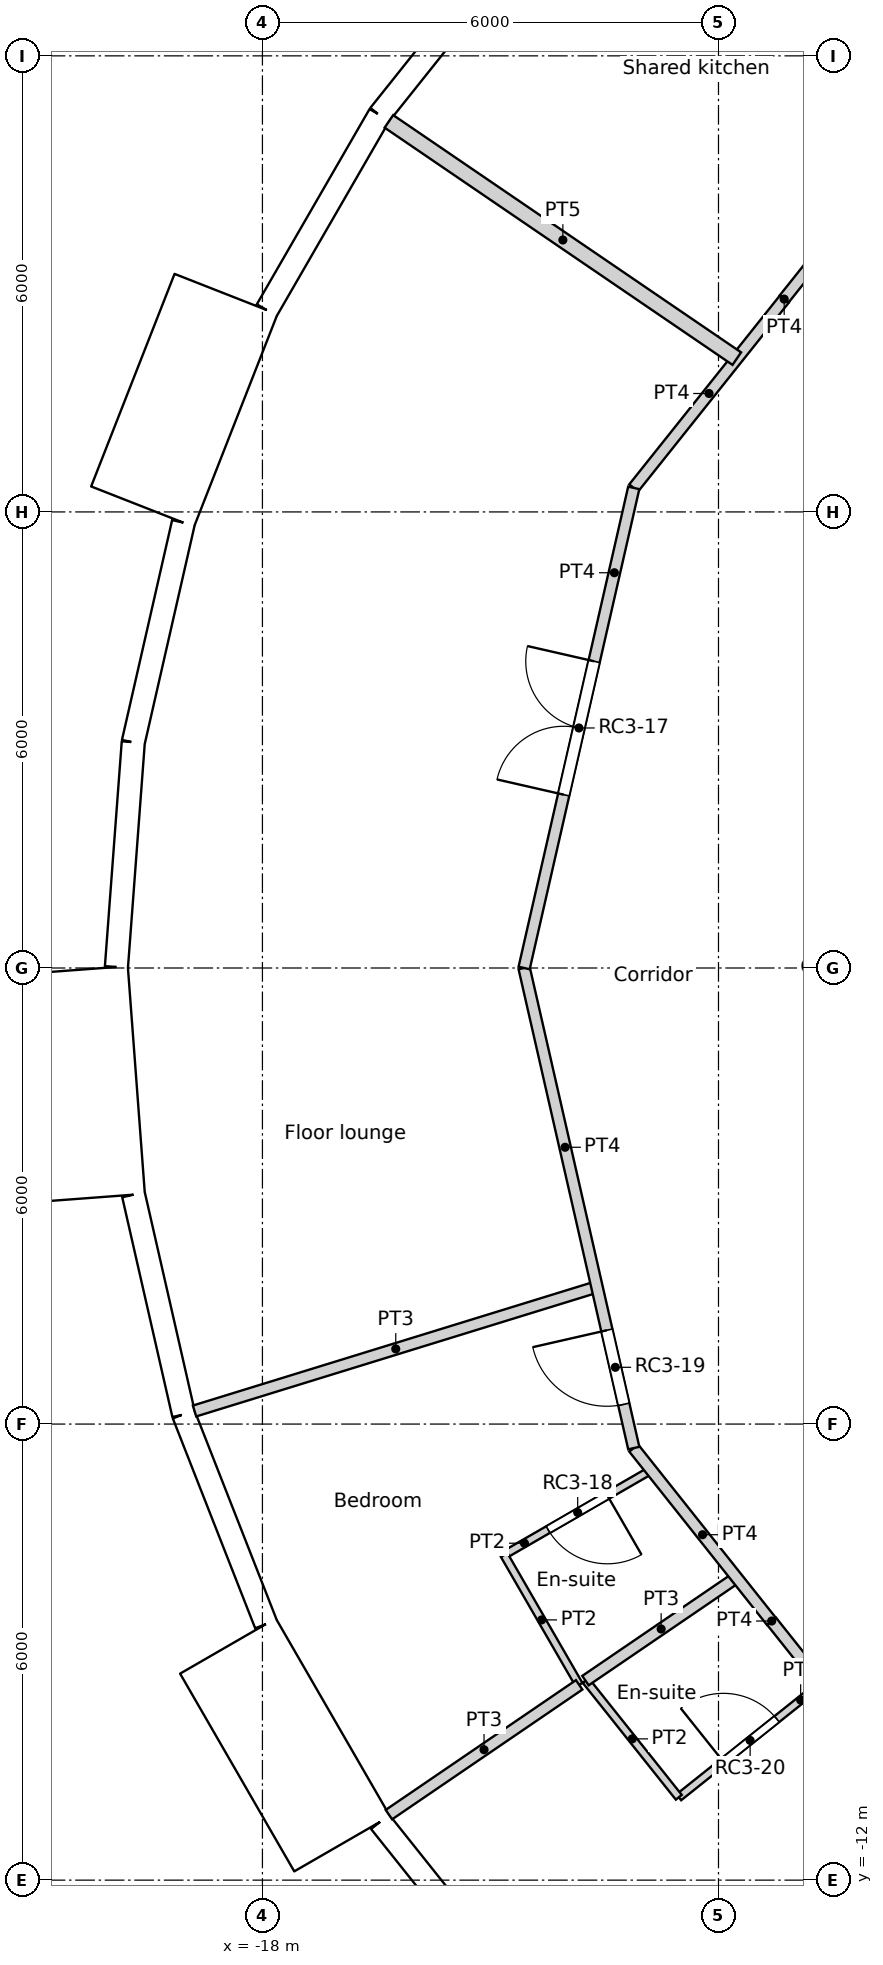
"""IFC4 building model, lengths in metres.
Left out: names, types, materials, properties, quantities, classifications, styles, units other than length and angle.
Written with IfcOpenShell. Run it as: python <this file> out.ifc"""

import sys

from ifc_helpers import new_model, si_unit, direction, frame, frame_2d, origin, origin_2d, place, context, subcontext, project, spatial, rectangle, circle, extrude, element, fill, save


model = new_model("IFC4")
c1 = context("Model", 3, precision=1e-05, world=origin(), true_north=direction((0.0, 1.0)))
c2 = subcontext(c1, "Body", "Model", "MODEL_VIEW")
j1 = project(units=[si_unit("LENGTHUNIT", "METRE"), si_unit("PLANEANGLEUNIT", "RADIAN")], contexts=[c1])
p1 = place(None, origin())
s1 = spatial("IfcSite", under=j1, at=p1, CompositionType="ELEMENT")
p2 = place(p1, origin())
s2 = spatial("IfcBuilding", under=s1, at=p2, CompositionType="ELEMENT")
p3 = place(p2, frame((0.0, 0.0, 252.6)))
s3 = spatial("IfcBuildingStorey", under=s2, at=p3, CompositionType="ELEMENT", Elevation=252.6)
for number, where, z_axis, x_axis in (
    (1, (-16.958, 8.167, 0.0), (0.0, 0.0, 1.0), (1.0, 0.0, 0.0)),
    (2, (-18.612, 2.805, 0.0), (0.0, 0.0, 1.0), (1.0, 0.0, 0.0)),
    (3, (-18.612, -2.805, 0.0), (0.0, 0.0, 1.0), (1.0, 0.0, 0.0)),
    (4, (-16.958, -8.167, 0.0), (0.0, 0.0, 1.0), (1.0, 0.0, 0.0)),
):
    element("IfcColumn", number, at=place(p3, frame(where, z_axis=z_axis, x_axis=x_axis)), inside=s3, PredefinedType="COLUMN", context=c2, shape_type="SweptSolid", body=[
        extrude(circle(Radius=0.55, at=origin_2d()), origin(), (0.0, 0.0, 1.0), 3.6),
    ])
p4 = place(p3, frame((-14.613, 13.538, 0.0), z_axis=(0.0, 0.0, 1.0), x_axis=(-0.623498236992, -0.781824755599, 0.0)))
e5 = element("IfcWall", 5, at=p4, inside=s3, PredefinedType="SOLIDWALL", context=c2, shape_type="SweptSolid", body=[
    extrude(rectangle(XDim=2.962, YDim=0.3, at=frame_2d((1.481, 0.0))), origin(), (0.0, 0.0, 1.0), 3.25),
])
p5 = place(p4, frame((1.481, 0.0, 1.55)))
e6 = element("IfcOpeningElement", 6, at=p5, cuts=e5, PredefinedType="OPENING", context=c2, shape_type="SweptSolid", body=[
    extrude(circle(Radius=0.9, at=origin_2d()), frame((0.0, 0.16, 0.0), z_axis=(0.0, -1.0, 0.0), x_axis=(1.0, 0.0, 0.0)), (0.0, 0.0, 1.0), 0.32),
])
p6 = place(p3, frame((-16.46, 11.222, 0.0), z_axis=(0.0, 0.0, 1.0), x_axis=(-0.499950756475, -0.86605383268, 0.0)))
e7 = element("IfcWall", 7, at=p6, inside=s3, PredefinedType="SOLIDWALL", context=c2, shape_type="SweptSolid", body=[
    extrude(rectangle(XDim=2.962, YDim=0.3, at=frame_2d((1.481, 0.0))), origin(), (0.0, 0.0, 1.0), 3.25),
])
p7 = place(p6, frame((1.481, 0.0, 1.55)))
e8 = element("IfcOpeningElement", 8, at=p7, cuts=e7, PredefinedType="OPENING", context=c2, shape_type="SweptSolid", body=[
    extrude(circle(Radius=0.9, at=origin_2d()), frame((0.0, 0.16, 0.0), z_axis=(0.0, -1.0, 0.0), x_axis=(1.0, 0.0, 0.0)), (0.0, 0.0, 1.0), 0.32),
])
p8 = place(p3, frame((-18.48, 8.864, -0.35), z_axis=(0.0, 0.0, 1.0), x_axis=(-0.36537792632, -0.93085926485, 0.0)))
e9 = element("IfcWall", 9, at=p8, inside=s3, PredefinedType="ELEMENTEDWALL", context=c2, shape_type="SweptSolid", body=[
    extrude(rectangle(XDim=3.0, YDim=1.45, at=frame_2d((1.5, 0.0))), origin(), (0.0, 0.0, 1.0), 3.6),
])
p9 = place(p8, frame((1.5, 0.0, 1.9)))
e10 = element("IfcOpeningElement", 10, at=p9, cuts=e9, PredefinedType="OPENING", context=c2, shape_type="SweptSolid", body=[
    extrude(circle(Radius=0.9, at=origin_2d()), frame((0.0, 0.735, 0.0), z_axis=(0.0, -1.0, 0.0), x_axis=(1.0, 0.0, 0.0)), (0.0, 0.0, 1.0), 1.47),
])
p10 = place(p3, frame((-19.04, 5.857, 0.0), z_axis=(0.0, 0.0, 1.0), x_axis=(-0.222529389789, -0.974925982155, 0.0)))
e11 = element("IfcWall", 11, at=p10, inside=s3, PredefinedType="SOLIDWALL", context=c2, shape_type="SweptSolid", body=[
    extrude(rectangle(XDim=2.962, YDim=0.3, at=frame_2d((1.481, 0.0))), origin(), (0.0, 0.0, 1.0), 3.25),
])
p11 = place(p10, frame((1.481, 0.0, 1.55)))
e12 = element("IfcOpeningElement", 12, at=p11, cuts=e11, PredefinedType="OPENING", context=c2, shape_type="SweptSolid", body=[
    extrude(circle(Radius=0.9, at=origin_2d()), frame((0.0, 0.16, 0.0), z_axis=(0.0, -1.0, 0.0), x_axis=(1.0, 0.0, 0.0)), (0.0, 0.0, 1.0), 0.32),
])
p12 = place(p3, frame((-19.699, 2.969, 0.0), z_axis=(0.0, 0.0, 1.0), x_axis=(-0.07474897196, -0.997202382263, 0.0)))
e13 = element("IfcWall", 13, at=p12, inside=s3, PredefinedType="SOLIDWALL", context=c2, shape_type="SweptSolid", body=[
    extrude(rectangle(XDim=2.962, YDim=0.3, at=frame_2d((1.481, 0.0))), origin(), (0.0, 0.0, 1.0), 3.25),
])
p13 = place(p12, frame((1.481, 0.0, 1.55)))
e14 = element("IfcOpeningElement", 14, at=p13, cuts=e13, PredefinedType="OPENING", context=c2, shape_type="SweptSolid", body=[
    extrude(circle(Radius=0.9, at=origin_2d()), frame((0.0, 0.16, 0.0), z_axis=(0.0, -1.0, 0.0), x_axis=(1.0, 0.0, 0.0)), (0.0, 0.0, 1.0), 0.32),
])
p14 = place(p3, frame((-20.496, -0.032, -0.35), z_axis=(0.0, 0.0, 1.0), x_axis=(0.074785902127, -0.997199613339, 0.0)))
e15 = element("IfcWall", 15, at=p14, inside=s3, PredefinedType="ELEMENTEDWALL", context=c2, shape_type="SweptSolid", body=[
    extrude(rectangle(XDim=3.0, YDim=1.45, at=frame_2d((1.5, 0.0))), origin(), (0.0, 0.0, 1.0), 3.6),
])
p15 = place(p14, frame((1.5, 0.0, 1.9)))
e16 = element("IfcOpeningElement", 16, at=p15, cuts=e15, PredefinedType="OPENING", context=c2, shape_type="SweptSolid", body=[
    extrude(circle(Radius=0.9, at=origin_2d()), frame((0.0, 0.735, 0.0), z_axis=(0.0, -1.0, 0.0), x_axis=(1.0, 0.0, 0.0)), (0.0, 0.0, 1.0), 1.47),
])
p16 = place(p3, frame((-19.696, -2.984, 0.0), z_axis=(0.0, 0.0, 1.0), x_axis=(0.222529389789, -0.974925982155, 0.0)))
e17 = element("IfcWall", 17, at=p16, inside=s3, PredefinedType="SOLIDWALL", context=c2, shape_type="SweptSolid", body=[
    extrude(rectangle(XDim=2.962, YDim=0.3, at=frame_2d((1.481, 0.0))), origin(), (0.0, 0.0, 1.0), 3.25),
])
p17 = place(p16, frame((1.481, 0.0, 1.55)))
e18 = element("IfcOpeningElement", 18, at=p17, cuts=e17, PredefinedType="OPENING", context=c2, shape_type="SweptSolid", body=[
    extrude(circle(Radius=0.9, at=origin_2d()), frame((0.0, 0.16, 0.0), z_axis=(0.0, -1.0, 0.0), x_axis=(1.0, 0.0, 0.0)), (0.0, 0.0, 1.0), 0.32),
])
p18 = place(p3, frame((-19.037, -5.872, 0.0), z_axis=(0.0, 0.0, 1.0), x_axis=(0.36530043032, -0.930889679612, 0.0)))
e19 = element("IfcWall", 19, at=p18, inside=s3, PredefinedType="SOLIDWALL", context=c2, shape_type="SweptSolid", body=[
    extrude(rectangle(XDim=2.962, YDim=0.3, at=frame_2d((1.481, 0.0))), origin(), (0.0, 0.0, 1.0), 3.25),
])
p19 = place(p18, frame((1.481, 0.0, 1.55)))
e20 = element("IfcOpeningElement", 20, at=p19, cuts=e19, PredefinedType="OPENING", context=c2, shape_type="SweptSolid", body=[
    extrude(circle(Radius=0.9, at=origin_2d()), frame((0.0, 0.16, 0.0), z_axis=(0.0, -1.0, 0.0), x_axis=(1.0, 0.0, 0.0)), (0.0, 0.0, 1.0), 0.32),
])
p20 = place(p3, frame((-18.452, -8.921, -0.35), z_axis=(0.0, 0.0, 1.0), x_axis=(0.499990139034, -0.866031096941, 0.0)))
e21 = element("IfcWall", 21, at=p20, inside=s3, PredefinedType="ELEMENTEDWALL", context=c2, shape_type="SweptSolid", body=[
    extrude(rectangle(XDim=3.0, YDim=1.45, at=frame_2d((1.5, 0.0))), origin(), (0.0, 0.0, 1.0), 3.6),
])
p21 = place(p20, frame((1.5, 0.0, 1.9)))
e22 = element("IfcOpeningElement", 22, at=p21, cuts=e21, PredefinedType="OPENING", context=c2, shape_type="SweptSolid", body=[
    extrude(circle(Radius=0.9, at=origin_2d()), frame((0.0, 0.735, 0.0), z_axis=(0.0, -1.0, 0.0), x_axis=(1.0, 0.0, 0.0)), (0.0, 0.0, 1.0), 1.47),
])
p22 = place(p3, frame((-16.451, -11.234, 0.0), z_axis=(0.0, 0.0, 1.0), x_axis=(0.623498236992, -0.781824755599, 0.0)))
e23 = element("IfcWall", 23, at=p22, inside=s3, PredefinedType="SOLIDWALL", context=c2, shape_type="SweptSolid", body=[
    extrude(rectangle(XDim=2.962, YDim=0.3, at=frame_2d((1.481, 0.0))), origin(), (0.0, 0.0, 1.0), 3.25),
])
p23 = place(p22, frame((1.481, 0.0, 1.55)))
e24 = element("IfcOpeningElement", 24, at=p23, cuts=e23, PredefinedType="OPENING", context=c2, shape_type="SweptSolid", body=[
    extrude(circle(Radius=0.9, at=origin_2d()), frame((0.0, 0.16, 0.0), z_axis=(0.0, -1.0, 0.0), x_axis=(1.0, 0.0, 0.0)), (0.0, 0.0, 1.0), 0.32),
])
p24 = place(p3, frame((-11.134, 8.8, 0.0), z_axis=(0.0, 0.0, 1.0), x_axis=(-1.0, 0.0, 0.0)))
e25 = element("IfcWall", 25, at=p24, inside=s3, PredefinedType="PARTITIONING", context=c2, shape_type="SweptSolid", body=[
    extrude(rectangle(XDim=0.003, YDim=0.15, at=frame_2d((0.001, 0.0))), origin(), (0.0, 0.0, 1.0), 3.25),
])
p25 = place(p3, frame((-11.136, 8.802, 0.0), z_axis=(0.0, 0.0, 1.0), x_axis=(0.623151397235, 0.782101231379, 0.0)))
e26 = element("IfcWall", 26, at=p25, inside=s3, PredefinedType="PARTITIONING", context=c2, shape_type="SweptSolid", body=[
    extrude(rectangle(XDim=3.301, YDim=0.15, at=frame_2d((1.65, 0.0))), origin(), (0.0, 0.0, 1.0), 3.25),
])
p26 = place(p3, frame((-11.3, -8.596, 0.0), z_axis=(0.0, 0.0, 1.0), x_axis=(0.623165080354, -0.782090328944, 0.0)))
e27 = element("IfcWall", 27, at=p26, inside=s3, PredefinedType="PARTITIONING", context=c2, shape_type="SweptSolid", body=[
    extrude(rectangle(XDim=3.564, YDim=0.15, at=frame_2d((1.782, 0.0))), origin(), (0.0, 0.0, 1.0), 3.25),
])
p27 = place(p26, frame((2.244, 0.0, 0.0)))
e28 = element("IfcOpeningElement", 28, at=p27, cuts=e27, PredefinedType="OPENING", context=c2, shape_type="SweptSolid", body=[
    extrude(rectangle(XDim=1.0, YDim=2.1, at=frame_2d((0.5, 1.05))), frame((0.0, 0.075, 0.0), z_axis=(0.0, -1.0, 0.0), x_axis=(1.0, 0.0, 0.0)), (0.0, 0.0, 1.0), 0.15),
])
p28 = place(p3, frame((-11.3, -8.596, 0.0), z_axis=(0.0, 0.0, 1.0), x_axis=(0.0, 1.0, 0.0)))
e29 = element("IfcWall", 29, at=p28, inside=s3, PredefinedType="PARTITIONING", context=c2, shape_type="SweptSolid", body=[
    extrude(rectangle(XDim=0.01, YDim=0.15, at=frame_2d((0.005, 0.0))), origin(), (0.0, 0.0, 1.0), 3.25),
])
p29 = place(p3, frame((-13.115, 6.316, 0.0), z_axis=(0.0, 0.0, 1.0), x_axis=(0.623560523309, 0.781775078761, 0.0)))
e30 = element("IfcWall", 30, at=p29, inside=s3, PredefinedType="PARTITIONING", context=c2, shape_type="SweptSolid", body=[
    extrude(rectangle(XDim=3.177, YDim=0.15, at=frame_2d((1.589, 0.0))), origin(), (0.0, 0.0, 1.0), 3.25),
])
p30 = place(p3, frame((-14.557, 0.0, 0.0), z_axis=(0.0, 0.0, 1.0), x_axis=(0.22264061368, -0.974900588337, 0.0)))
e31 = element("IfcWall", 31, at=p30, inside=s3, PredefinedType="PARTITIONING", context=c2, shape_type="SweptSolid", body=[
    extrude(rectangle(XDim=6.479, YDim=0.15, at=frame_2d((3.239, 0.0))), origin(), (0.0, 0.0, 1.0), 3.25),
])
p31 = place(p30, frame((4.888, 0.0, 0.0)))
e32 = element("IfcOpeningElement", 32, at=p31, cuts=e31, PredefinedType="OPENING", context=c2, shape_type="SweptSolid", body=[
    extrude(rectangle(XDim=1.0, YDim=2.1, at=frame_2d((0.5, 1.05))), frame((0.0, 0.075, 0.0), z_axis=(0.0, -1.0, 0.0), x_axis=(1.0, 0.0, 0.0)), (0.0, 0.0, 1.0), 0.15),
])
p32 = place(p3, frame((-14.557, 0.0, 0.0), z_axis=(0.0, 0.0, 1.0), x_axis=(0.222568978642, 0.97491694505, 0.0)))
e33 = element("IfcWall", 33, at=p32, inside=s3, PredefinedType="PARTITIONING", context=c2, shape_type="SweptSolid", body=[
    extrude(rectangle(XDim=6.479, YDim=0.15, at=frame_2d((3.239, 0.0))), origin(), (0.0, 0.0, 1.0), 3.25),
])
p33 = place(p32, frame((2.339, 0.0, 0.0)))
e34 = element("IfcOpeningElement", 34, at=p33, cuts=e33, PredefinedType="OPENING", context=c2, shape_type="SweptSolid", body=[
    extrude(rectangle(XDim=1.8, YDim=2.1, at=frame_2d((0.9, 1.05))), frame((0.0, 0.075, 0.0), z_axis=(0.0, -1.0, 0.0), x_axis=(1.0, 0.0, 0.0)), (0.0, 0.0, 1.0), 0.15),
])
p34 = place(p3, frame((-13.115, -6.316, 0.0), z_axis=(0.0, 0.0, 1.0), x_axis=(0.622042479172, -0.782983495423, 0.0)))
e35 = element("IfcWall", 35, at=p34, inside=s3, PredefinedType="PARTITIONING", context=c2, shape_type="SweptSolid", body=[
    extrude(rectangle(XDim=2.911, YDim=0.15, at=frame_2d((1.456, 0.0))), origin(), (0.0, 0.0, 1.0), 3.25),
])
p35 = place(p3, frame((-16.336, 11.138, 0.0), z_axis=(0.0, 0.0, 1.0), x_axis=(0.826207761897, -0.563365542238, 0.0)))
e36 = element("IfcWall", 36, at=p35, inside=s3, PredefinedType="PARTITIONING", context=c2, shape_type="SweptSolid", body=[
    extrude(rectangle(XDim=5.54, YDim=0.2, at=frame_2d((2.77, 0.0))), origin(), (0.0, 0.0, 1.0), 3.25),
])
p36 = place(p3, frame((-18.893, -5.828, 0.0), z_axis=(0.0, 0.0, 1.0), x_axis=(0.955580602693, 0.294729896274, 0.0)))
e37 = element("IfcWall", 37, at=p36, inside=s3, PredefinedType="PARTITIONING", context=c2, shape_type="SweptSolid", body=[
    extrude(rectangle(XDim=5.54, YDim=0.15, at=frame_2d((2.77, 0.0))), origin(), (0.0, 0.0, 1.0), 3.25),
])
p37 = place(p3, frame((-14.82, -7.722, 0.0), z_axis=(0.0, 0.0, 1.0), x_axis=(0.866076416361, 0.499911633214, 0.0)))
e38 = element("IfcWall", 38, at=p37, inside=s3, PredefinedType="PARTITIONING", context=c2, shape_type="SweptSolid", body=[
    extrude(rectangle(XDim=2.234, YDim=0.1, at=frame_2d((1.117, 0.0))), origin(), (0.0, 0.0, 1.0), 3.25),
])
p38 = place(p37, frame((0.667, 0.0, 0.0)))
e39 = element("IfcOpeningElement", 39, at=p38, cuts=e38, PredefinedType="OPENING", context=c2, shape_type="SweptSolid", body=[
    extrude(rectangle(XDim=0.9, YDim=2.04, at=frame_2d((0.45, 1.02))), frame((0.0, 0.05, 0.0), z_axis=(0.0, -1.0, 0.0), x_axis=(1.0, 0.0, 0.0)), (0.0, 0.0, 1.0), 0.1),
])
p39 = place(p3, frame((-14.82, -7.722, 0.0), z_axis=(0.0, 0.0, 1.0), x_axis=(0.500143626598, -0.865942465048, 0.0)))
e40 = element("IfcWall", 40, at=p39, inside=s3, PredefinedType="PARTITIONING", context=c2, shape_type="SweptSolid", body=[
    extrude(rectangle(XDim=1.974, YDim=0.1, at=frame_2d((0.987, 0.0))), origin(), (0.0, 0.0, 1.0), 3.25),
])
p40 = place(p3, frame((-16.336, -11.138, 0.0), z_axis=(0.0, 0.0, 1.0), x_axis=(0.826152320289, 0.56344684193, 0.0)))
e41 = element("IfcWall", 41, at=p40, inside=s3, PredefinedType="PARTITIONING", context=c2, shape_type="SweptSolid", body=[
    extrude(rectangle(XDim=3.03, YDim=0.15, at=frame_2d((1.515, 0.0))), origin(), (0.0, 0.0, 1.0), 3.25),
])
p41 = place(p3, frame((-13.75, -9.375, 0.0), z_axis=(0.0, 0.0, 1.0), x_axis=(0.826143746222, 0.563459413426, 0.0)))
e42 = element("IfcWall", 42, at=p41, inside=s3, PredefinedType="PARTITIONING", context=c2, shape_type="SweptSolid", body=[
    extrude(rectangle(XDim=2.41, YDim=0.15, at=frame_2d((1.205, 0.0))), origin(), (0.0, 0.0, 1.0), 3.25),
])
p42 = place(p3, frame((-13.747, -9.373, 0.0), z_axis=(0.0, 0.0, 1.0), x_axis=(0.623330716607, -0.781958322249, 0.0)))
e43 = element("IfcWall", 43, at=p42, inside=s3, PredefinedType="PARTITIONING", context=c2, shape_type="SweptSolid", body=[
    extrude(rectangle(XDim=1.965, YDim=0.1, at=frame_2d((0.983, 0.0))), origin(), (0.0, 0.0, 1.0), 3.25),
])
p43 = place(p3, frame((-12.522, -10.91, 0.0), z_axis=(0.0, 0.0, 1.0), x_axis=(0.781830263661, 0.623491330191, 0.0)))
e44 = element("IfcWall", 44, at=p43, inside=s3, PredefinedType="PARTITIONING", context=c2, shape_type="SweptSolid", body=[
    extrude(rectangle(XDim=2.401, YDim=0.1, at=frame_2d((1.2, 0.0))), origin(), (0.0, 0.0, 1.0), 3.25),
])
p44 = place(p43, frame((0.75, 0.0, 0.0)))
e45 = element("IfcOpeningElement", 45, at=p44, cuts=e44, PredefinedType="OPENING", context=c2, shape_type="SweptSolid", body=[
    extrude(rectangle(XDim=0.9, YDim=2.04, at=frame_2d((0.45, 1.02))), frame((0.0, 0.05, 0.0), z_axis=(0.0, -1.0, 0.0), x_axis=(1.0, 0.0, 0.0)), (0.0, 0.0, 1.0), 0.1),
])
p45 = place(p3, frame((-12.327, -15.458, 0.0), z_axis=(0.0, 0.0, 1.0), x_axis=(0.623460949534, 0.781854490558, 0.0)))
e46 = element("IfcWall", 46, at=p45, inside=s3, PredefinedType="PARTITIONING", context=c2, shape_type="SweptSolid", body=[
    extrude(rectangle(XDim=5.214, YDim=0.15, at=frame_2d((2.607, 0.0))), origin(), (0.0, 0.0, 1.0), 3.25),
])
p46 = place(p5, origin())
e47 = element("IfcWindow", 47, at=p46, inside=s3, PartitioningType="SINGLE_PANEL", PredefinedType="WINDOW", context=c2, shape_type="SweptSolid", body=[
    extrude(circle(Radius=0.9, at=origin_2d()), frame((0.0, 0.12, 0.0), z_axis=(0.0, -1.0, 0.0), x_axis=(1.0, 0.0, 0.0)), (0.0, 0.0, 1.0), 0.1),
])
fill(e6, e47)
p47 = place(p7, origin())
e48 = element("IfcWindow", 48, at=p47, inside=s3, PartitioningType="SINGLE_PANEL", PredefinedType="WINDOW", context=c2, shape_type="SweptSolid", body=[
    extrude(circle(Radius=0.9, at=origin_2d()), frame((0.0, 0.12, 0.0), z_axis=(0.0, -1.0, 0.0), x_axis=(1.0, 0.0, 0.0)), (0.0, 0.0, 1.0), 0.1),
])
fill(e8, e48)
p48 = place(p9, origin())
e49 = element("IfcWindow", 49, at=p48, inside=s3, PartitioningType="SINGLE_PANEL", PredefinedType="WINDOW", context=c2, shape_type="SweptSolid", body=[
    extrude(circle(Radius=0.9, at=origin_2d()), frame((0.0, 0.695, 0.0), z_axis=(0.0, -1.0, 0.0), x_axis=(1.0, 0.0, 0.0)), (0.0, 0.0, 1.0), 0.1),
])
fill(e10, e49)
p49 = place(p11, origin())
e50 = element("IfcWindow", 50, at=p49, inside=s3, PartitioningType="SINGLE_PANEL", PredefinedType="WINDOW", context=c2, shape_type="SweptSolid", body=[
    extrude(circle(Radius=0.9, at=origin_2d()), frame((0.0, 0.12, 0.0), z_axis=(0.0, -1.0, 0.0), x_axis=(1.0, 0.0, 0.0)), (0.0, 0.0, 1.0), 0.1),
])
fill(e12, e50)
p50 = place(p13, origin())
e51 = element("IfcWindow", 51, at=p50, inside=s3, PartitioningType="SINGLE_PANEL", PredefinedType="WINDOW", context=c2, shape_type="SweptSolid", body=[
    extrude(circle(Radius=0.9, at=origin_2d()), frame((0.0, 0.12, 0.0), z_axis=(0.0, -1.0, 0.0), x_axis=(1.0, 0.0, 0.0)), (0.0, 0.0, 1.0), 0.1),
])
fill(e14, e51)
p51 = place(p15, origin())
e52 = element("IfcWindow", 52, at=p51, inside=s3, PartitioningType="SINGLE_PANEL", PredefinedType="WINDOW", context=c2, shape_type="SweptSolid", body=[
    extrude(circle(Radius=0.9, at=origin_2d()), frame((0.0, 0.695, 0.0), z_axis=(0.0, -1.0, 0.0), x_axis=(1.0, 0.0, 0.0)), (0.0, 0.0, 1.0), 0.1),
])
fill(e16, e52)
p52 = place(p17, origin())
e53 = element("IfcWindow", 53, at=p52, inside=s3, PartitioningType="SINGLE_PANEL", PredefinedType="WINDOW", context=c2, shape_type="SweptSolid", body=[
    extrude(circle(Radius=0.9, at=origin_2d()), frame((0.0, 0.12, 0.0), z_axis=(0.0, -1.0, 0.0), x_axis=(1.0, 0.0, 0.0)), (0.0, 0.0, 1.0), 0.1),
])
fill(e18, e53)
p53 = place(p19, origin())
e54 = element("IfcWindow", 54, at=p53, inside=s3, PartitioningType="SINGLE_PANEL", PredefinedType="WINDOW", context=c2, shape_type="SweptSolid", body=[
    extrude(circle(Radius=0.9, at=origin_2d()), frame((0.0, 0.12, 0.0), z_axis=(0.0, -1.0, 0.0), x_axis=(1.0, 0.0, 0.0)), (0.0, 0.0, 1.0), 0.1),
])
fill(e20, e54)
p54 = place(p21, origin())
e55 = element("IfcWindow", 55, at=p54, inside=s3, PartitioningType="SINGLE_PANEL", PredefinedType="WINDOW", context=c2, shape_type="SweptSolid", body=[
    extrude(circle(Radius=0.9, at=origin_2d()), frame((0.0, 0.695, 0.0), z_axis=(0.0, -1.0, 0.0), x_axis=(1.0, 0.0, 0.0)), (0.0, 0.0, 1.0), 0.1),
])
fill(e22, e55)
p55 = place(p23, origin())
e56 = element("IfcWindow", 56, at=p55, inside=s3, PartitioningType="SINGLE_PANEL", PredefinedType="WINDOW", context=c2, shape_type="SweptSolid", body=[
    extrude(circle(Radius=0.9, at=origin_2d()), frame((0.0, 0.12, 0.0), z_axis=(0.0, -1.0, 0.0), x_axis=(1.0, 0.0, 0.0)), (0.0, 0.0, 1.0), 0.1),
])
fill(e24, e56)
p56 = place(p33, origin())
e57 = element("IfcDoor", 57, at=p56, inside=s3, OperationType="DOUBLE_DOOR_SINGLE_SWING", PredefinedType="DOOR", context=c2, shape_type="SweptSolid", body=[
    extrude(rectangle(XDim=1.8, YDim=2.1, at=frame_2d((0.9, 1.05))), frame((0.0, 0.025, 0.0), z_axis=(0.0, -1.0, 0.0), x_axis=(1.0, 0.0, 0.0)), (0.0, 0.0, 1.0), 0.05),
])
fill(e34, e57)
p57 = place(p38, origin())
e58 = element("IfcDoor", 58, at=p57, inside=s3, OperationType="SINGLE_SWING_LEFT", PredefinedType="DOOR", context=c2, shape_type="SweptSolid", body=[
    extrude(rectangle(XDim=0.9, YDim=2.04, at=frame_2d((0.45, 1.02))), frame((0.0, 0.025, 0.0), z_axis=(0.0, -1.0, 0.0), x_axis=(1.0, 0.0, 0.0)), (0.0, 0.0, 1.0), 0.05),
])
fill(e39, e58)
p58 = place(p31, origin())
e59 = element("IfcDoor", 59, at=p58, inside=s3, OperationType="SINGLE_SWING_RIGHT", PredefinedType="DOOR", context=c2, shape_type="SweptSolid", body=[
    extrude(rectangle(XDim=1.0, YDim=2.1, at=frame_2d((0.5, 1.05))), frame((0.0, 0.025, 0.0), z_axis=(0.0, -1.0, 0.0), x_axis=(1.0, 0.0, 0.0)), (0.0, 0.0, 1.0), 0.05),
])
fill(e32, e59)
p59 = place(p44, origin())
e60 = element("IfcDoor", 60, at=p59, inside=s3, OperationType="SINGLE_SWING_LEFT", PredefinedType="DOOR", context=c2, shape_type="SweptSolid", body=[
    extrude(rectangle(XDim=0.9, YDim=2.04, at=frame_2d((0.45, 1.02))), frame((0.0, 0.025, 0.0), z_axis=(0.0, -1.0, 0.0), x_axis=(1.0, 0.0, 0.0)), (0.0, 0.0, 1.0), 0.05),
])
fill(e45, e60)
save(model, sys.argv[1])
